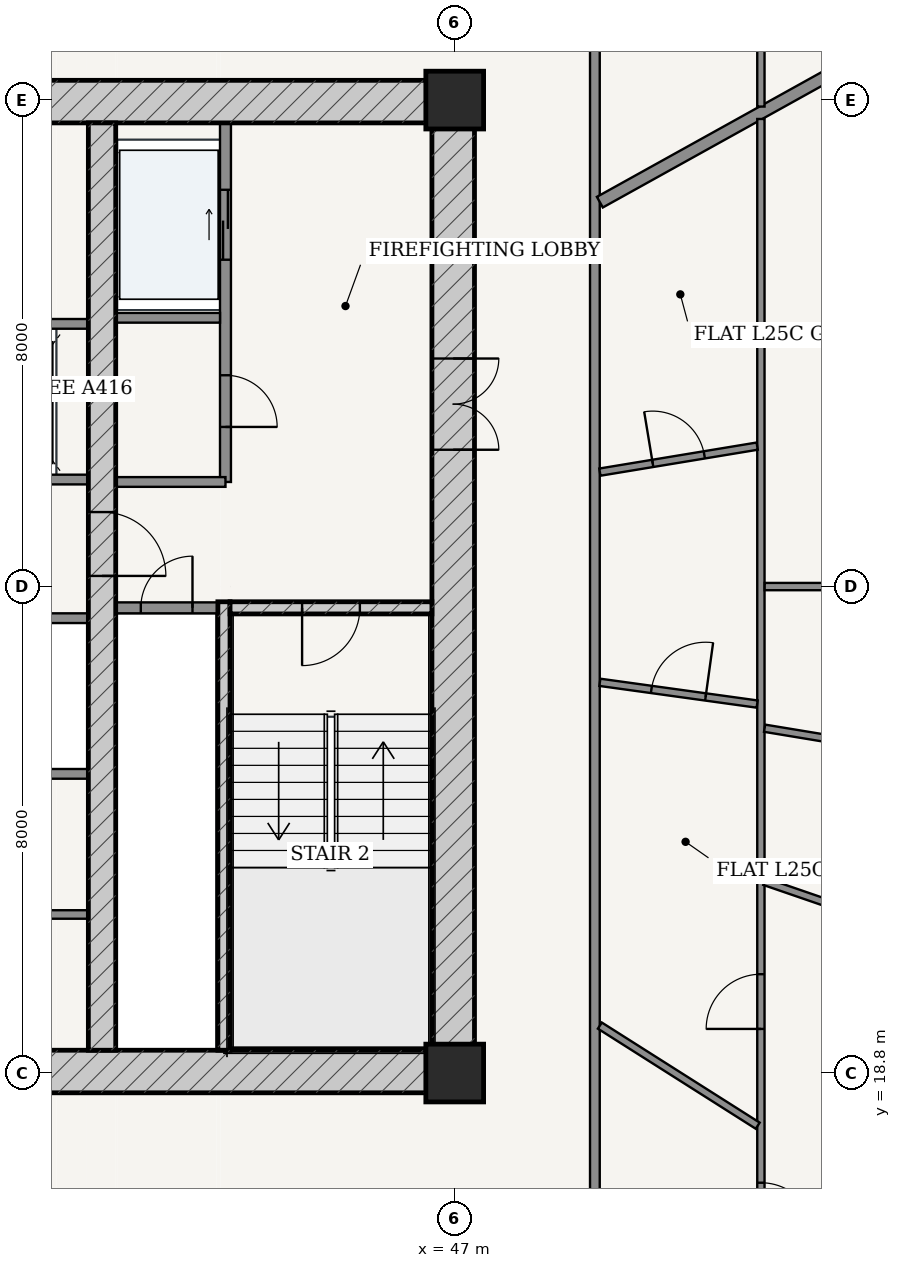
"""IFC4 building model, lengths in metres.
Left out: names, types, materials, properties, quantities, classifications, styles, units other than length and angle.
Written with IfcOpenShell. Run it as: python <this file> out.ifc"""

import sys

from ifc_helpers import new_model, si_unit, direction, frame, frame_2d, origin, origin_2d, place, context, subcontext, project, spatial, rectangle, extrude, source, transform, mapped, element, fill, save


model = new_model("IFC4")
c1 = context("Model", 3, precision=1e-05, world=origin(), true_north=direction((-0.2419218956, 0.970295726276)))
c2 = subcontext(c1, "Body", "Model", "MODEL_VIEW")
j1 = project(units=[si_unit("LENGTHUNIT", "METRE"), si_unit("PLANEANGLEUNIT", "RADIAN")], contexts=[c1])
p1 = place(None, origin())
s1 = spatial("IfcSite", under=j1, at=p1, CompositionType="ELEMENT")
p2 = place(p1, origin())
s2 = spatial("IfcBuilding", under=s1, at=p2, CompositionType="ELEMENT")
p3 = place(p2, frame((0.0, 0.0, 97.8)))
s3 = spatial("IfcBuildingStorey", under=s2, at=p3, CompositionType="ELEMENT", Elevation=97.8)
for number, where, z_axis, x_axis in (
    (1, (47.0, 18.8, 0.0), (0.0, 0.0, 1.0), (1.0, 0.0, 0.0)),
    (2, (47.0, 34.8, 0.0), (0.0, 0.0, 1.0), (1.0, 0.0, 0.0)),
):
    element("IfcColumn", number, at=place(p3, frame(where, z_axis=z_axis, x_axis=x_axis)), inside=s3, PredefinedType="COLUMN", context=c2, shape_type="SweptSolid", body=[
        extrude(rectangle(XDim=0.95, YDim=0.95, at=origin_2d()), origin(), (0.0, 0.0, 1.0), 3.6),
    ])
p4 = place(p3, frame((28.675, 18.825, 0.0), z_axis=(0.0, 0.0, 1.0), x_axis=(1.0, 0.0, 0.0)))
e3 = element("IfcWall", 3, at=p4, inside=s3, PredefinedType="SHEAR", context=c2, shape_type="SweptSolid", body=[
    extrude(rectangle(XDim=18.65, YDim=0.7, at=frame_2d((9.325, 0.0))), origin(), (0.0, 0.0, 1.0), 3.325),
])
p5 = place(p4, frame((8.9, 0.0, 0.0)))
e4 = element("IfcOpeningElement", 4, at=p5, cuts=e3, PredefinedType="OPENING", context=c2, shape_type="SweptSolid", body=[
    extrude(rectangle(XDim=0.85, YDim=2.1, at=frame_2d((0.425, 1.05))), frame((0.0, 0.36, 0.0), z_axis=(0.0, -1.0, 0.0), x_axis=(1.0, 0.0, 0.0)), (0.0, 0.0, 1.0), 0.72),
])
p6 = place(p3, frame((28.675, 34.775, 0.0), z_axis=(0.0, 0.0, 1.0), x_axis=(1.0, 0.0, 0.0)))
e5 = element("IfcWall", 5, at=p6, inside=s3, PredefinedType="SHEAR", context=c2, shape_type="SweptSolid", body=[
    extrude(rectangle(XDim=18.65, YDim=0.7, at=frame_2d((9.325, 0.0))), origin(), (0.0, 0.0, 1.0), 3.325),
])
p7 = place(p6, frame((8.9, 0.0, 0.0)))
e6 = element("IfcOpeningElement", 6, at=p7, cuts=e5, PredefinedType="OPENING", context=c2, shape_type="SweptSolid", body=[
    extrude(rectangle(XDim=0.85, YDim=2.1, at=frame_2d((0.425, 1.05))), frame((0.0, 0.36, 0.0), z_axis=(0.0, -1.0, 0.0), x_axis=(1.0, 0.0, 0.0)), (0.0, 0.0, 1.0), 0.72),
])
p8 = place(p3, frame((46.975, 19.175, 0.0), z_axis=(0.0, 0.0, 1.0), x_axis=(0.0, 1.0, 0.0)))
e7 = element("IfcWall", 7, at=p8, inside=s3, PredefinedType="SHEAR", context=c2, shape_type="SweptSolid", body=[
    extrude(rectangle(XDim=15.25, YDim=0.7, at=frame_2d((7.625, 0.0))), origin(), (0.0, 0.0, 1.0), 3.325),
])
p9 = place(p8, frame((9.875, 0.0, 0.0)))
e8 = element("IfcOpeningElement", 8, at=p9, cuts=e7, PredefinedType="OPENING", context=c2, shape_type="SweptSolid", body=[
    extrude(rectangle(XDim=1.5, YDim=2.2, at=frame_2d((0.75, 1.1))), frame((0.0, 0.36, 0.0), z_axis=(0.0, -1.0, 0.0), x_axis=(1.0, 0.0, 0.0)), (0.0, 0.0, 1.0), 0.72),
])
p10 = place(p3, frame((43.205, 19.175, 0.0), z_axis=(0.0, 0.0, 1.0), x_axis=(0.0, 1.0, 0.0)))
e9 = element("IfcWall", 9, at=p10, inside=s3, PredefinedType="SOLIDWALL", context=c2, shape_type="SweptSolid", body=[
    extrude(rectangle(XDim=7.375, YDim=0.2, at=frame_2d((3.688, 0.0))), origin(), (0.0, 0.0, 1.0), 3.325),
])
p11 = place(p3, frame((43.305, 26.45, 0.0), z_axis=(0.0, 0.0, 1.0), x_axis=(1.0, 0.0, 0.0)))
e10 = element("IfcWall", 10, at=p11, inside=s3, PredefinedType="SOLIDWALL", context=c2, shape_type="SweptSolid", body=[
    extrude(rectangle(XDim=3.32, YDim=0.2, at=frame_2d((1.66, 0.0))), origin(), (0.0, 0.0, 1.0), 3.325),
])
p12 = place(p11, frame((1.185, 0.0, 0.0)))
e11 = element("IfcOpeningElement", 11, at=p12, cuts=e10, PredefinedType="OPENING", context=c2, shape_type="SweptSolid", body=[
    extrude(rectangle(XDim=0.95, YDim=2.15, at=frame_2d((0.475, 1.075))), frame((0.0, 0.11, 0.0), z_axis=(0.0, -1.0, 0.0), x_axis=(1.0, 0.0, 0.0)), (0.0, 0.0, 1.0), 0.22),
])
p13 = place(p3, frame((41.2, 19.175, 0.0), z_axis=(0.0, 0.0, 1.0), x_axis=(0.0, 1.0, 0.0)))
e12 = element("IfcWall", 12, at=p13, inside=s3, PredefinedType="SHEAR", context=c2, shape_type="SweptSolid", body=[
    extrude(rectangle(XDim=15.25, YDim=0.45, at=frame_2d((7.625, 0.0))), origin(), (0.0, 0.0, 1.0), 3.325),
])
p14 = place(p13, frame((7.8, 0.0, 0.0)))
e13 = element("IfcOpeningElement", 13, at=p14, cuts=e12, PredefinedType="OPENING", context=c2, shape_type="SweptSolid", body=[
    extrude(rectangle(XDim=1.05, YDim=2.15, at=frame_2d((0.525, 1.075))), frame((0.0, 0.235, 0.0), z_axis=(0.0, -1.0, 0.0), x_axis=(1.0, 0.0, 0.0)), (0.0, 0.0, 1.0), 0.47),
])
p15 = place(p3, frame((41.425, 26.45, 0.0), z_axis=(0.0, 0.0, 1.0), x_axis=(1.0, 0.0, 0.0)))
e14 = element("IfcWall", 14, at=p15, inside=s3, PredefinedType="PARTITIONING", context=c2, shape_type="SweptSolid", body=[
    extrude(rectangle(XDim=1.675, YDim=0.18, at=frame_2d((0.837, 0.0))), origin(), (0.0, 0.0, 1.0), 3.325),
])
p16 = place(p15, frame((0.413, 0.0, 0.0)))
e15 = element("IfcOpeningElement", 15, at=p16, cuts=e14, PredefinedType="OPENING", context=c2, shape_type="SweptSolid", body=[
    extrude(rectangle(XDim=0.85, YDim=2.1, at=frame_2d((0.425, 1.05))), frame((0.0, 0.1, 0.0), z_axis=(0.0, -1.0, 0.0), x_axis=(1.0, 0.0, 0.0)), (0.0, 0.0, 1.0), 0.2),
])
p17 = place(p3, frame((43.23, 28.52, 0.0), z_axis=(0.0, 0.0, 1.0), x_axis=(0.0, 1.0, 0.0)))
e16 = element("IfcWall", 16, at=p17, inside=s3, PredefinedType="PARTITIONING", context=c2, shape_type="SweptSolid", body=[
    extrude(rectangle(XDim=5.905, YDim=0.18, at=frame_2d((2.953, 0.0))), origin(), (0.0, 0.0, 1.0), 3.325),
])
p18 = place(p17, frame((0.905, 0.0, 0.0)))
e17 = element("IfcOpeningElement", 17, at=p18, cuts=e16, PredefinedType="OPENING", context=c2, shape_type="SweptSolid", body=[
    extrude(rectangle(XDim=0.85, YDim=2.1, at=frame_2d((0.425, 1.05))), frame((0.0, 0.1, 0.0), z_axis=(0.0, -1.0, 0.0), x_axis=(1.0, 0.0, 0.0)), (0.0, 0.0, 1.0), 0.2),
])
p19 = place(p17, frame((3.655, 0.0, 0.0)))
e18 = element("IfcOpeningElement", 18, at=p19, cuts=e16, PredefinedType="OPENING", context=c2, shape_type="SweptSolid", body=[
    extrude(rectangle(XDim=1.15, YDim=2.2, at=frame_2d((0.575, 1.1))), frame((0.0, 0.1, 0.0), z_axis=(0.0, -1.0, 0.0), x_axis=(1.0, 0.0, 0.0)), (0.0, 0.0, 1.0), 0.2),
])
p20 = place(p3, frame((41.425, 31.22, 0.0), z_axis=(0.0, 0.0, 1.0), x_axis=(1.0, 0.0, 0.0)))
e19 = element("IfcWall", 19, at=p20, inside=s3, PredefinedType="PARTITIONING", context=c2, shape_type="SweptSolid", body=[
    extrude(rectangle(XDim=1.715, YDim=0.16, at=frame_2d((0.857, 0.0))), origin(), (0.0, 0.0, 1.0), 3.325),
])
p21 = place(p3, frame((41.425, 28.52, 0.0), z_axis=(0.0, 0.0, 1.0), x_axis=(1.0, 0.0, 0.0)))
e20 = element("IfcWall", 20, at=p21, inside=s3, PredefinedType="PARTITIONING", context=c2, shape_type="SweptSolid", body=[
    extrude(rectangle(XDim=1.805, YDim=0.16, at=frame_2d((0.902, 0.0))), origin(), (0.0, 0.0, 1.0), 3.325),
])
p22 = place(p3, frame((35.025, 28.56, 0.0), z_axis=(0.0, 0.0, 1.0), x_axis=(1.0, 0.0, 0.0)))
e21 = element("IfcWall", 21, at=p22, inside=s3, PredefinedType="PARTITIONING", context=c2, shape_type="SweptSolid", body=[
    extrude(rectangle(XDim=5.95, YDim=0.16, at=frame_2d((2.975, 0.0))), origin(), (0.0, 0.0, 1.0), 3.325),
])
p23 = place(p22, frame((0.76, 0.0, 0.0)))
e22 = element("IfcOpeningElement", 22, at=p23, cuts=e21, PredefinedType="OPENING", context=c2, shape_type="SweptSolid", body=[
    extrude(rectangle(XDim=1.1, YDim=2.2, at=frame_2d((0.55, 1.1))), frame((0.0, 0.09, 0.0), z_axis=(0.0, -1.0, 0.0), x_axis=(1.0, 0.0, 0.0)), (0.0, 0.0, 1.0), 0.18),
])
p24 = place(p22, frame((2.425, 0.0, 0.0)))
e23 = element("IfcOpeningElement", 23, at=p24, cuts=e21, PredefinedType="OPENING", context=c2, shape_type="SweptSolid", body=[
    extrude(rectangle(XDim=1.1, YDim=2.2, at=frame_2d((0.55, 1.1))), frame((0.0, 0.09, 0.0), z_axis=(0.0, -1.0, 0.0), x_axis=(1.0, 0.0, 0.0)), (0.0, 0.0, 1.0), 0.18),
])
p25 = place(p22, frame((4.09, 0.0, 0.0)))
e24 = element("IfcOpeningElement", 24, at=p25, cuts=e21, PredefinedType="OPENING", context=c2, shape_type="SweptSolid", body=[
    extrude(rectangle(XDim=1.1, YDim=2.2, at=frame_2d((0.55, 1.1))), frame((0.0, 0.09, 0.0), z_axis=(0.0, -1.0, 0.0), x_axis=(1.0, 0.0, 0.0)), (0.0, 0.0, 1.0), 0.18),
])
for number, where, z_axis, x_axis in (
    (25, (35.025, 31.12, 0.0), (0.0, 0.0, 1.0), (1.0, 0.0, 0.0)),
    (26, (35.025, 26.28, 0.0), (0.0, 0.0, 1.0), (1.0, 0.0, 0.0)),
    (27, (35.025, 23.72, 0.0), (0.0, 0.0, 1.0), (1.0, 0.0, 0.0)),
):
    element("IfcWall", number, at=place(p3, frame(where, z_axis=z_axis, x_axis=x_axis)), inside=s3, PredefinedType="PARTITIONING", context=c2, shape_type="SweptSolid", body=[
        extrude(rectangle(XDim=5.95, YDim=0.16, at=frame_2d((2.975, 0.0))), origin(), (0.0, 0.0, 1.0), 3.325),
    ])
p26 = place(p3, frame((35.025, 21.407, 0.0), z_axis=(0.0, 0.0, 1.0), x_axis=(1.0, 0.0, 0.0)))
e28 = element("IfcWall", 28, at=p26, inside=s3, PredefinedType="PARTITIONING", context=c2, shape_type="SweptSolid", body=[
    extrude(rectangle(XDim=5.95, YDim=0.14, at=frame_2d((2.975, 0.0))), origin(), (0.0, 0.0, 1.0), 3.325),
])
p27 = place(p26, frame((2.55, 0.0, 0.0)))
e29 = element("IfcOpeningElement", 29, at=p27, cuts=e28, PredefinedType="OPENING", context=c2, shape_type="SweptSolid", body=[
    extrude(rectangle(XDim=0.85, YDim=2.1, at=frame_2d((0.425, 1.05))), frame((0.0, 0.08, 0.0), z_axis=(0.0, -1.0, 0.0), x_axis=(1.0, 0.0, 0.0)), (0.0, 0.0, 1.0), 0.16),
])
p28 = place(p3, frame((49.305, 16.575, 0.0), z_axis=(0.0, 0.0, 1.0), x_axis=(0.0, 1.0, 0.0)))
e30 = element("IfcWall", 30, at=p28, inside=s3, PredefinedType="PARTITIONING", context=c2, shape_type="SweptSolid", body=[
    extrude(rectangle(XDim=20.45, YDim=0.16, at=frame_2d((10.225, 0.0))), origin(), (0.0, 0.0, 1.0), 2.767),
])
p29 = place(p3, frame((49.387, 33.121, 0.0), z_axis=(0.0, 0.0, 1.0), x_axis=(0.874320165728, 0.485349613992, 0.0)))
e31 = element("IfcWall", 31, at=p29, inside=s3, PredefinedType="PARTITIONING", context=c2, shape_type="SweptSolid", body=[
    extrude(rectangle(XDim=12.156, YDim=0.2, at=frame_2d((6.078, 0.0))), origin(), (0.0, 0.0, 1.0), 2.767),
])
p30 = place(p3, frame((52.035, 39.835, 0.0), z_axis=(0.0, 0.0, 1.0), x_axis=(0.0, -1.0, 0.0)))
e32 = element("IfcWall", 32, at=p30, inside=s3, PredefinedType="PARTITIONING", context=c2, shape_type="SweptSolid", body=[
    extrude(rectangle(XDim=5.142, YDim=0.12, at=frame_2d((2.571, 0.0))), origin(), (0.0, 0.0, 1.0), 3.004),
])
p31 = place(p3, frame((52.035, 34.49, 0.0), z_axis=(0.0, 0.0, 1.0), x_axis=(0.0, -1.0, 0.0)))
e33 = element("IfcWall", 33, at=p31, inside=s3, PredefinedType="PARTITIONING", context=c2, shape_type="SweptSolid", body=[
    extrude(rectangle(XDim=20.725, YDim=0.12, at=frame_2d((10.362, 0.0))), origin(), (0.0, 0.0, 1.0), 2.767),
])
p32 = place(p31, frame((17.493, 0.0, 0.0)))
e34 = element("IfcOpeningElement", 34, at=p32, cuts=e33, PredefinedType="OPENING", context=c2, shape_type="SweptSolid", body=[
    extrude(rectangle(XDim=0.9, YDim=2.15, at=frame_2d((0.45, 1.075))), frame((0.0, 0.07, 0.0), z_axis=(0.0, -1.0, 0.0), x_axis=(1.0, 0.0, 0.0)), (0.0, 0.0, 1.0), 0.14),
])
p33 = place(p31, frame((14.064, 0.0, 0.0)))
e35 = element("IfcOpeningElement", 35, at=p33, cuts=e33, PredefinedType="OPENING", context=c2, shape_type="SweptSolid", body=[
    extrude(rectangle(XDim=0.9, YDim=2.15, at=frame_2d((0.45, 1.075))), frame((0.0, 0.07, 0.0), z_axis=(0.0, -1.0, 0.0), x_axis=(1.0, 0.0, 0.0)), (0.0, 0.0, 1.0), 0.14),
])
p34 = place(p3, frame((52.094, 21.95, 0.0), z_axis=(0.0, 0.0, 1.0), x_axis=(0.945573120726, -0.32540970078, 0.0)))
e36 = element("IfcWall", 36, at=p34, inside=s3, PredefinedType="PARTITIONING", context=c2, shape_type="SweptSolid", body=[
    extrude(rectangle(XDim=11.022, YDim=0.12, at=frame_2d((5.511, 0.0))), origin(), (0.0, 0.0, 1.0), 2.767),
])
p35 = place(p34, frame((5.061, 0.0, 0.0)))
e37 = element("IfcOpeningElement", 37, at=p35, cuts=e36, PredefinedType="OPENING", context=c2, shape_type="SweptSolid", body=[
    extrude(rectangle(XDim=0.9, YDim=2.15, at=frame_2d((0.45, 1.075))), frame((0.0, 0.07, 0.0), z_axis=(0.0, -1.0, 0.0), x_axis=(1.0, 0.0, 0.0)), (0.0, 0.0, 1.0), 0.14),
])
p36 = place(p3, frame((52.096, 24.47, 0.0), z_axis=(0.0, 0.0, 1.0), x_axis=(0.986618264768, -0.163047231274, 0.0)))
e38 = element("IfcWall", 38, at=p36, inside=s3, PredefinedType="PARTITIONING", context=c2, shape_type="SweptSolid", body=[
    extrude(rectangle(XDim=12.039, YDim=0.12, at=frame_2d((6.02, 0.0))), origin(), (0.0, 0.0, 1.0), 2.767),
])
p37 = place(p36, frame((4.496, 0.0, 0.0)))
e39 = element("IfcOpeningElement", 39, at=p37, cuts=e38, PredefinedType="OPENING", context=c2, shape_type="SweptSolid", body=[
    extrude(rectangle(XDim=0.9, YDim=2.15, at=frame_2d((0.45, 1.075))), frame((0.0, 0.07, 0.0), z_axis=(0.0, -1.0, 0.0), x_axis=(1.0, 0.0, 0.0)), (0.0, 0.0, 1.0), 0.14),
])
p38 = place(p3, frame((52.097, 26.8, 0.0), z_axis=(0.0, 0.0, 1.0), x_axis=(1.0, 0.0, 0.0)))
e40 = element("IfcWall", 40, at=p38, inside=s3, PredefinedType="PARTITIONING", context=c2, shape_type="SweptSolid", body=[
    extrude(rectangle(XDim=12.443, YDim=0.12, at=frame_2d((6.222, 0.0))), origin(), (0.0, 0.0, 1.0), 2.767),
])
p39 = place(p38, frame((5.771, 0.0, 0.0)))
e41 = element("IfcOpeningElement", 41, at=p39, cuts=e40, PredefinedType="OPENING", context=c2, shape_type="SweptSolid", body=[
    extrude(rectangle(XDim=0.9, YDim=2.15, at=frame_2d((0.45, 1.075))), frame((0.0, 0.07, 0.0), z_axis=(0.0, -1.0, 0.0), x_axis=(1.0, 0.0, 0.0)), (0.0, 0.0, 1.0), 0.14),
])
p40 = place(p3, frame((49.387, 19.58, 0.0), z_axis=(0.0, 0.0, 1.0), x_axis=(0.844540118368, -0.535492286094, 0.0)))
e42 = element("IfcWall", 42, at=p40, inside=s3, PredefinedType="PARTITIONING", context=c2, shape_type="SweptSolid", body=[
    extrude(rectangle(XDim=3.074, YDim=0.12, at=frame_2d((1.537, 0.0))), origin(), (0.0, 0.0, 1.0), 3.325),
])
p41 = place(p3, frame((49.387, 25.225, 0.0), z_axis=(0.0, 0.0, 1.0), x_axis=(0.990575253555, -0.136969584375, 0.0)))
e43 = element("IfcWall", 43, at=p41, inside=s3, PredefinedType="PARTITIONING", context=c2, shape_type="SweptSolid", body=[
    extrude(rectangle(XDim=2.611, YDim=0.12, at=frame_2d((1.306, 0.0))), origin(), (0.0, 0.0, 1.0), 3.325),
])
p42 = place(p41, frame((0.856, 0.0, 0.0)))
e44 = element("IfcOpeningElement", 44, at=p42, cuts=e43, PredefinedType="OPENING", context=c2, shape_type="SweptSolid", body=[
    extrude(rectangle(XDim=0.9, YDim=2.15, at=frame_2d((0.45, 1.075))), frame((0.0, 0.07, 0.0), z_axis=(0.0, -1.0, 0.0), x_axis=(1.0, 0.0, 0.0)), (0.0, 0.0, 1.0), 0.14),
])
p43 = place(p3, frame((49.387, 28.682, 0.0), z_axis=(0.0, 0.0, 1.0), x_axis=(0.986619477472, 0.163039892889, 0.0)))
e45 = element("IfcWall", 45, at=p43, inside=s3, PredefinedType="PARTITIONING", context=c2, shape_type="SweptSolid", body=[
    extrude(rectangle(XDim=2.622, YDim=0.12, at=frame_2d((1.311, 0.0))), origin(), (0.0, 0.0, 1.0), 2.767),
])
p44 = place(p43, frame((0.881, 0.0, 0.0)))
e46 = element("IfcOpeningElement", 46, at=p44, cuts=e45, PredefinedType="OPENING", context=c2, shape_type="SweptSolid", body=[
    extrude(rectangle(XDim=0.86, YDim=2.15, at=frame_2d((0.43, 1.075))), frame((0.0, 0.07, 0.0), z_axis=(0.0, -1.0, 0.0), x_axis=(1.0, 0.0, 0.0)), (0.0, 0.0, 1.0), 0.14),
])
m1 = source(origin(), c2, "Body", "SweptSolid", [
    extrude(rectangle(XDim=1.5, YDim=2.2, at=frame_2d((0.75, 1.1))), frame((0.0, 0.025, 0.0), z_axis=(0.0, -1.0, 0.0), x_axis=(1.0, 0.0, 0.0)), (0.0, 0.0, 1.0), 0.05),
])
p45 = place(p9, frame((1.5, 0.0, 0.0), z_axis=(0.0, 0.0, 1.0), x_axis=(-1.0, 0.0, 0.0)))
e47 = element("IfcDoor", 47, at=p45, inside=s3, OperationType="DOUBLE_DOOR_SINGLE_SWING", PredefinedType="DOOR", context=c2, shape_type="MappedRepresentation", body=[
    mapped(m1, transform((0.0, 0.0, 0.0), scale=1.0)),
])
fill(e8, e47)
m2 = source(origin(), c2, "Body", "SweptSolid", [
    extrude(rectangle(XDim=1.05, YDim=2.15, at=frame_2d((0.525, 1.075))), frame((0.0, 0.025, 0.0), z_axis=(0.0, -1.0, 0.0), x_axis=(1.0, 0.0, 0.0)), (0.0, 0.0, 1.0), 0.05),
])
p46 = place(p14, frame((1.05, 0.0, 0.0), z_axis=(0.0, 0.0, 1.0), x_axis=(-1.0, 0.0, 0.0)))
e48 = element("IfcDoor", 48, at=p46, inside=s3, OperationType="SINGLE_SWING_RIGHT", PredefinedType="DOOR", context=c2, shape_type="MappedRepresentation", body=[
    mapped(m2, transform((0.0, 0.0, 0.0), scale=1.0)),
])
fill(e13, e48)
m3 = source(origin(), c2, "Body", "SweptSolid", [
    extrude(rectangle(XDim=0.95, YDim=2.15, at=frame_2d((0.475, 1.075))), frame((0.0, 0.025, 0.0), z_axis=(0.0, -1.0, 0.0), x_axis=(1.0, 0.0, 0.0)), (0.0, 0.0, 1.0), 0.05),
])
p47 = place(p12, frame((0.95, 0.0, 0.0), z_axis=(0.0, 0.0, 1.0), x_axis=(-1.0, 0.0, 0.0)))
e49 = element("IfcDoor", 49, at=p47, inside=s3, OperationType="SINGLE_SWING_RIGHT", PredefinedType="DOOR", context=c2, shape_type="MappedRepresentation", body=[
    mapped(m3, transform((0.0, 0.0, 0.0), scale=1.0)),
])
fill(e11, e49)
m4 = source(origin(), c2, "Body", "SweptSolid", [
    extrude(rectangle(XDim=0.85, YDim=2.1, at=frame_2d((0.425, 1.05))), frame((0.0, 0.025, 0.0), z_axis=(0.0, -1.0, 0.0), x_axis=(1.0, 0.0, 0.0)), (0.0, 0.0, 1.0), 0.05),
])
p48 = place(p16, origin())
e50 = element("IfcDoor", 50, at=p48, inside=s3, OperationType="SINGLE_SWING_RIGHT", PredefinedType="DOOR", context=c2, shape_type="MappedRepresentation", body=[
    mapped(m4, transform((0.0, 0.0, 0.0), scale=1.0)),
])
fill(e15, e50)
p49 = place(p18, frame((0.85, 0.0, 0.0), z_axis=(0.0, 0.0, 1.0), x_axis=(-1.0, 0.0, 0.0)))
e51 = element("IfcDoor", 51, at=p49, inside=s3, OperationType="SINGLE_SWING_RIGHT", PredefinedType="DOOR", context=c2, shape_type="MappedRepresentation", body=[
    mapped(m4, transform((0.0, 0.0, 0.0), scale=1.0)),
])
fill(e17, e51)
m5 = source(origin(), c2, "Body", "SweptSolid", [
    extrude(rectangle(XDim=1.15, YDim=2.2, at=frame_2d((0.575, 1.1))), frame((0.0, 0.025, 0.0), z_axis=(0.0, -1.0, 0.0), x_axis=(1.0, 0.0, 0.0)), (0.0, 0.0, 1.0), 0.05),
])
p50 = place(p19, origin())
e52 = element("IfcDoor", 52, at=p50, inside=s3, OperationType="DOUBLE_DOOR_SLIDING", PredefinedType="DOOR", context=c2, shape_type="MappedRepresentation", body=[
    mapped(m5, transform((0.0, 0.0, 0.0), scale=1.0)),
])
fill(e18, e52)
m6 = source(origin(), c2, "Body", "SweptSolid", [
    extrude(rectangle(XDim=0.9, YDim=2.15, at=frame_2d((0.45, 1.075))), frame((0.0, 0.025, 0.0), z_axis=(0.0, -1.0, 0.0), x_axis=(1.0, 0.0, 0.0)), (0.0, 0.0, 1.0), 0.05),
])
p51 = place(p32, origin())
e53 = element("IfcDoor", 53, at=p51, inside=s3, OperationType="SINGLE_SWING_RIGHT", PredefinedType="DOOR", context=c2, shape_type="MappedRepresentation", body=[
    mapped(m6, transform((0.0, 0.0, 0.0), scale=1.0)),
])
fill(e34, e53)
p52 = place(p33, frame((0.9, 0.0, 0.0), z_axis=(0.0, 0.0, 1.0), x_axis=(-1.0, 0.0, 0.0)))
e54 = element("IfcDoor", 54, at=p52, inside=s3, OperationType="SINGLE_SWING_LEFT", PredefinedType="DOOR", context=c2, shape_type="MappedRepresentation", body=[
    mapped(m6, transform((0.0, 0.0, 0.0), scale=1.0)),
])
fill(e35, e54)
p53 = place(p42, origin())
e55 = element("IfcDoor", 55, at=p53, inside=s3, OperationType="SINGLE_SWING_RIGHT", PredefinedType="DOOR", context=c2, shape_type="MappedRepresentation", body=[
    mapped(m6, transform((0.0, 0.0, 0.0), scale=1.0)),
])
fill(e44, e55)
m7 = source(origin(), c2, "Body", "SweptSolid", [
    extrude(rectangle(XDim=0.86, YDim=2.15, at=frame_2d((0.43, 1.075))), frame((0.0, 0.025, 0.0), z_axis=(0.0, -1.0, 0.0), x_axis=(1.0, 0.0, 0.0)), (0.0, 0.0, 1.0), 0.05),
])
p54 = place(p44, origin())
e56 = element("IfcDoor", 56, at=p54, inside=s3, OperationType="SINGLE_SWING_LEFT", PredefinedType="DOOR", context=c2, shape_type="MappedRepresentation", body=[
    mapped(m7, transform((0.0, 0.0, 0.0), scale=1.0)),
])
fill(e46, e56)
save(model, sys.argv[1])
